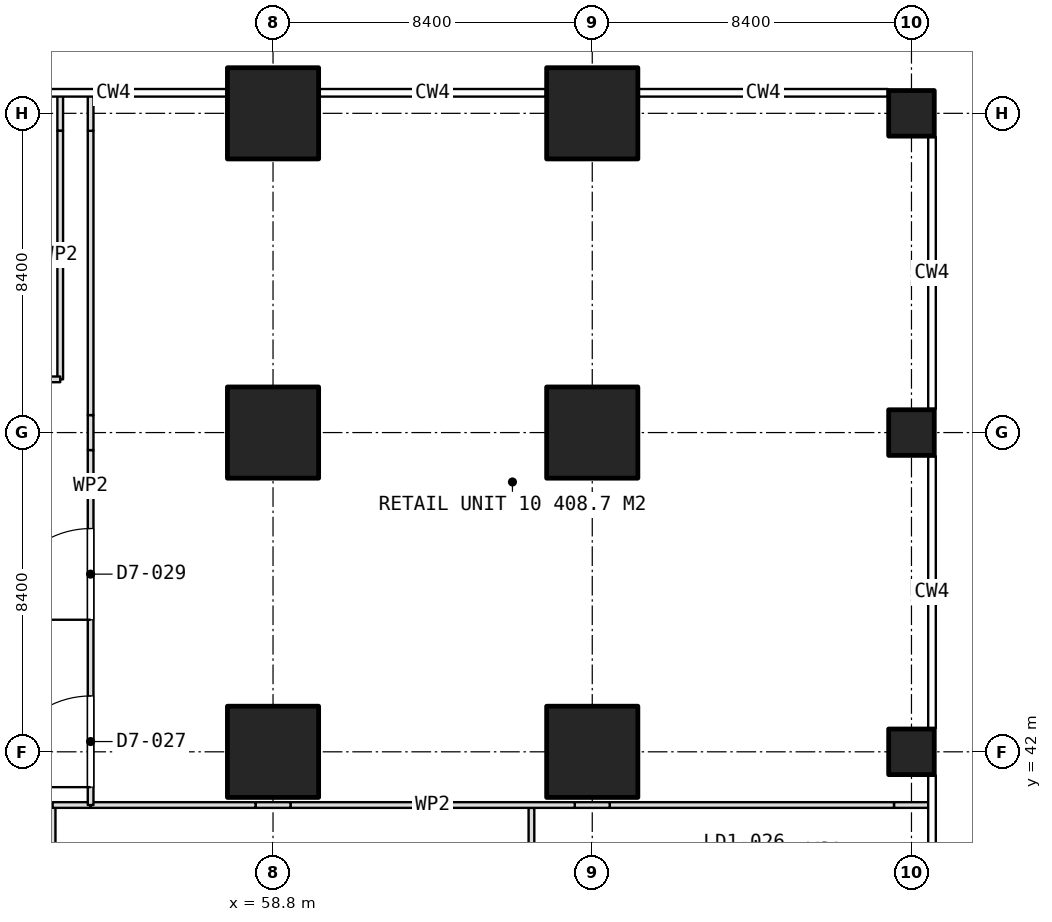
"""IFC4 building model, lengths in metres.
Left out: names, types, materials, properties, quantities, classifications, styles, units other than length and angle.
Written with IfcOpenShell. Run it as: python <this file> out.ifc"""

import sys

from ifc_helpers import new_model, si_unit, direction, frame, frame_2d, origin, origin_2d, place, context, subcontext, project, spatial, rectangle, extrude, element, fill, save


model = new_model("IFC4")
c1 = context("Model", 3, precision=1e-05, world=origin(), true_north=direction((0.0, 1.0)))
c2 = subcontext(c1, "Body", "Model", "MODEL_VIEW")
j1 = project(units=[si_unit("LENGTHUNIT", "METRE"), si_unit("PLANEANGLEUNIT", "RADIAN")], contexts=[c1])
p1 = place(None, origin())
s1 = spatial("IfcSite", under=j1, at=p1, CompositionType="ELEMENT")
p2 = place(p1, origin())
s2 = spatial("IfcBuilding", under=s1, at=p2, CompositionType="ELEMENT")
p3 = place(p2, frame((0.0, 0.0, 10.4)))
s3 = spatial("IfcBuildingStorey", under=s2, at=p3, CompositionType="ELEMENT", Elevation=10.4)
for number, where, z_axis, x_axis in (
    (1, (58.8, 42.0, 0.0), (0.0, 0.0, 1.0), (1.0, 0.0, 0.0)),
    (2, (58.8, 50.4, 0.0), (0.0, 0.0, 1.0), (1.0, 0.0, 0.0)),
    (3, (58.8, 58.8, 0.0), (0.0, 0.0, 1.0), (1.0, 0.0, 0.0)),
    (4, (67.2, 42.0, 0.0), (0.0, 0.0, 1.0), (1.0, 0.0, 0.0)),
    (5, (67.2, 50.4, 0.0), (0.0, 0.0, 1.0), (1.0, 0.0, 0.0)),
    (6, (67.2, 58.8, 0.0), (0.0, 0.0, 1.0), (1.0, 0.0, 0.0)),
):
    element("IfcColumn", number, at=place(p3, frame(where, z_axis=z_axis, x_axis=x_axis)), inside=s3, PredefinedType="COLUMN", context=c2, shape_type="SweptSolid", body=[
        extrude(rectangle(XDim=2.4, YDim=2.4, at=origin_2d()), origin(), (0.0, 0.0, 1.0), 5.0),
    ])
for number, where, z_axis, x_axis in (
    (7, (75.6, 42.0, 0.0), (0.0, 0.0, 1.0), (1.0, 0.0, 0.0)),
    (8, (75.6, 50.4, 0.0), (0.0, 0.0, 1.0), (1.0, 0.0, 0.0)),
    (9, (75.6, 58.8, 0.0), (0.0, 0.0, 1.0), (1.0, 0.0, 0.0)),
):
    element("IfcColumn", number, at=place(p3, frame(where, z_axis=z_axis, x_axis=x_axis)), inside=s3, PredefinedType="COLUMN", context=c2, shape_type="SweptSolid", body=[
        extrude(rectangle(XDim=1.2, YDim=1.2, at=origin_2d()), origin(), (0.0, 0.0, 1.0), 5.0),
    ])
p4 = place(p3, frame((76.09, 40.6, 0.0), z_axis=(0.0, 0.0, 1.0), x_axis=(-1.0, 0.0, 0.0)))
e10 = element("IfcWall", 10, at=p4, inside=s3, PredefinedType="PARTITIONING", context=c2, shape_type="SweptSolid", body=[
    extrude(rectangle(XDim=0.95, YDim=0.15, at=frame_2d((0.475, 0.0))), origin(), (0.0, 0.0, 1.0), 2.9),
])
p5 = place(p3, frame((75.14, 40.6, 0.0), z_axis=(0.0, 0.0, 1.0), x_axis=(-1.0, 0.0, 0.0)))
e11 = element("IfcWall", 11, at=p5, inside=s3, PredefinedType="PARTITIONING", context=c2, shape_type="SweptSolid", body=[
    extrude(rectangle(XDim=7.48, YDim=0.15, at=frame_2d((3.74, 0.0))), origin(), (0.0, 0.0, 1.0), 4.7),
])
p6 = place(p3, frame((67.66, 40.6, 0.0), z_axis=(0.0, 0.0, 1.0), x_axis=(-1.0, 0.0, 0.0)))
e12 = element("IfcWall", 12, at=p6, inside=s3, PredefinedType="PARTITIONING", context=c2, shape_type="SweptSolid", body=[
    extrude(rectangle(XDim=0.92, YDim=0.15, at=frame_2d((0.46, 0.0))), origin(), (0.0, 0.0, 1.0), 2.9),
])
p7 = place(p3, frame((66.74, 40.6, 0.0), z_axis=(0.0, 0.0, 1.0), x_axis=(-1.0, 0.0, 0.0)))
e13 = element("IfcWall", 13, at=p7, inside=s3, PredefinedType="PARTITIONING", context=c2, shape_type="SweptSolid", body=[
    extrude(rectangle(XDim=7.48, YDim=0.15, at=frame_2d((3.74, 0.0))), origin(), (0.0, 0.0, 1.0), 4.7),
])
p8 = place(p3, frame((59.26, 40.6, 0.0), z_axis=(0.0, 0.0, 1.0), x_axis=(-1.0, 0.0, 0.0)))
e14 = element("IfcWall", 14, at=p8, inside=s3, PredefinedType="PARTITIONING", context=c2, shape_type="SweptSolid", body=[
    extrude(rectangle(XDim=0.92, YDim=0.15, at=frame_2d((0.46, 0.0))), origin(), (0.0, 0.0, 1.0), 2.9),
])
p9 = place(p3, frame((58.34, 40.6, 0.0), z_axis=(0.0, 0.0, 1.0), x_axis=(-1.0, 0.0, 0.0)))
e15 = element("IfcWall", 15, at=p9, inside=s3, PredefinedType="PARTITIONING", context=c2, shape_type="SweptSolid", body=[
    extrude(rectangle(XDim=4.34, YDim=0.15, at=frame_2d((2.17, 0.0))), origin(), (0.0, 0.0, 1.0), 4.7),
])
p10 = place(p3, frame((54.0, 40.6, 0.0), z_axis=(0.0, 0.0, 1.0), x_axis=(0.0, 1.0, 0.0)))
e16 = element("IfcWall", 16, at=p10, inside=s3, PredefinedType="PARTITIONING", context=c2, shape_type="SweptSolid", body=[
    extrude(rectangle(XDim=9.34, YDim=0.15, at=frame_2d((4.67, 0.0))), origin(), (0.0, 0.0, 1.0), 4.7),
])
p11 = place(p10, frame((4.875, 0.0, 0.0)))
e17 = element("IfcOpeningElement", 17, at=p11, cuts=e16, PredefinedType="OPENING", context=c2, shape_type="SweptSolid", body=[
    extrude(rectangle(XDim=2.4, YDim=2.4, at=frame_2d((1.2, 1.2))), frame((0.0, 0.085, 0.0), z_axis=(0.0, -1.0, 0.0), x_axis=(1.0, 0.0, 0.0)), (0.0, 0.0, 1.0), 0.17),
])
p12 = place(p10, frame((0.47, 0.0, 0.0)))
e18 = element("IfcOpeningElement", 18, at=p12, cuts=e16, PredefinedType="OPENING", context=c2, shape_type="SweptSolid", body=[
    extrude(rectangle(XDim=2.4, YDim=2.4, at=frame_2d((1.2, 1.2))), frame((0.0, 0.085, 0.0), z_axis=(0.0, -1.0, 0.0), x_axis=(1.0, 0.0, 0.0)), (0.0, 0.0, 1.0), 0.17),
])
p13 = place(p3, frame((54.0, 49.94, 0.0), z_axis=(0.0, 0.0, 1.0), x_axis=(0.0, 1.0, 0.0)))
e19 = element("IfcWall", 19, at=p13, inside=s3, PredefinedType="PARTITIONING", context=c2, shape_type="SweptSolid", body=[
    extrude(rectangle(XDim=0.92, YDim=0.15, at=frame_2d((0.46, 0.0))), origin(), (0.0, 0.0, 1.0), 2.9),
])
p14 = place(p3, frame((54.0, 50.86, 0.0), z_axis=(0.0, 0.0, 1.0), x_axis=(0.0, 1.0, 0.0)))
e20 = element("IfcWall", 20, at=p14, inside=s3, PredefinedType="PARTITIONING", context=c2, shape_type="SweptSolid", body=[
    extrude(rectangle(XDim=7.48, YDim=0.15, at=frame_2d((3.74, 0.0))), origin(), (0.0, 0.0, 1.0), 4.7),
])
p15 = place(p3, frame((54.0, 58.34, 0.0), z_axis=(0.0, 0.0, 1.0), x_axis=(0.0, 1.0, 0.0)))
e21 = element("IfcWall", 21, at=p15, inside=s3, PredefinedType="PARTITIONING", context=c2, shape_type="SweptSolid", body=[
    extrude(rectangle(XDim=0.95, YDim=0.15, at=frame_2d((0.475, 0.0))), origin(), (0.0, 0.0, 1.0), 2.9),
])
p16 = place(p3, frame((53.2, 51.8, 0.0), z_axis=(0.0, 0.0, 1.0), x_axis=(-1.0, 0.0, 0.0)))
e22 = element("IfcWall", 22, at=p16, inside=s3, PredefinedType="PARTITIONING", context=c2, shape_type="SweptSolid", body=[
    extrude(rectangle(XDim=2.34, YDim=0.15, at=frame_2d((1.17, 0.0))), origin(), (0.0, 0.0, 1.0), 4.7),
])
p17 = place(p3, frame((53.2, 59.29, 0.0), z_axis=(0.0, 0.0, 1.0), x_axis=(0.0, -1.0, 0.0)))
e23 = element("IfcWall", 23, at=p17, inside=s3, PredefinedType="PARTITIONING", context=c2, shape_type="SweptSolid", body=[
    extrude(rectangle(XDim=0.95, YDim=0.15, at=frame_2d((0.475, 0.0))), origin(), (0.0, 0.0, 1.0), 2.9),
])
p18 = place(p3, frame((53.2, 58.34, 0.0), z_axis=(0.0, 0.0, 1.0), x_axis=(0.0, -1.0, 0.0)))
e24 = element("IfcWall", 24, at=p18, inside=s3, PredefinedType="PARTITIONING", context=c2, shape_type="SweptSolid", body=[
    extrude(rectangle(XDim=6.54, YDim=0.15, at=frame_2d((3.27, 0.0))), origin(), (0.0, 0.0, 1.0), 4.7),
])
p19 = place(p3, frame((53.0, 30.8, 0.0), z_axis=(0.0, 0.0, 1.0), x_axis=(0.0, 1.0, 0.0)))
e25 = element("IfcWall", 25, at=p19, inside=s3, PredefinedType="PARTITIONING", context=c2, shape_type="SweptSolid", body=[
    extrude(rectangle(XDim=9.8, YDim=0.15, at=frame_2d((4.9, 0.0))), origin(), (0.0, 0.0, 1.0), 4.7),
])
p20 = place(p19, frame((3.7, 0.0, 0.0)))
e26 = element("IfcOpeningElement", 26, at=p20, cuts=e25, PredefinedType="OPENING", context=c2, shape_type="SweptSolid", body=[
    extrude(rectangle(XDim=2.4, YDim=2.4, at=frame_2d((1.2, 1.2))), frame((0.0, 0.085, 0.0), z_axis=(0.0, -1.0, 0.0), x_axis=(1.0, 0.0, 0.0)), (0.0, 0.0, 1.0), 0.17),
])
p21 = place(p3, frame((53.0, 40.6, 0.0), z_axis=(0.0, 0.0, 1.0), x_axis=(1.0, 0.0, 0.0)))
e27 = element("IfcWall", 27, at=p21, inside=s3, PredefinedType="PARTITIONING", context=c2, shape_type="SweptSolid", body=[
    extrude(rectangle(XDim=1.0, YDim=0.15, at=frame_2d((0.5, 0.0))), origin(), (0.0, 0.0, 1.0), 4.7),
])
p22 = place(p3, frame((65.6, 40.525, 0.0), z_axis=(0.0, 0.0, 1.0), x_axis=(0.0, -1.0, 0.0)))
e28 = element("IfcWall", 28, at=p22, inside=s3, PredefinedType="PARTITIONING", context=c2, shape_type="SweptSolid", body=[
    extrude(rectangle(XDim=6.465, YDim=0.15, at=frame_2d((3.232, 0.0))), origin(), (0.0, 0.0, 1.0), 4.7),
])
p23 = place(p11, origin())
e29 = element("IfcDoor", 29, at=p23, inside=s3, OperationType="DOUBLE_DOOR_SINGLE_SWING", PredefinedType="DOOR", context=c2, shape_type="SweptSolid", body=[
    extrude(rectangle(XDim=2.4, YDim=2.4, at=frame_2d((1.2, 1.2))), frame((0.0, 0.025, 0.0), z_axis=(0.0, -1.0, 0.0), x_axis=(1.0, 0.0, 0.0)), (0.0, 0.0, 1.0), 0.05),
])
fill(e17, e29)
p24 = place(p12, origin())
e30 = element("IfcDoor", 30, at=p24, inside=s3, OperationType="DOUBLE_DOOR_SINGLE_SWING", PredefinedType="DOOR", context=c2, shape_type="SweptSolid", body=[
    extrude(rectangle(XDim=2.4, YDim=2.4, at=frame_2d((1.2, 1.2))), frame((0.0, 0.025, 0.0), z_axis=(0.0, -1.0, 0.0), x_axis=(1.0, 0.0, 0.0)), (0.0, 0.0, 1.0), 0.05),
])
fill(e18, e30)
save(model, sys.argv[1])
